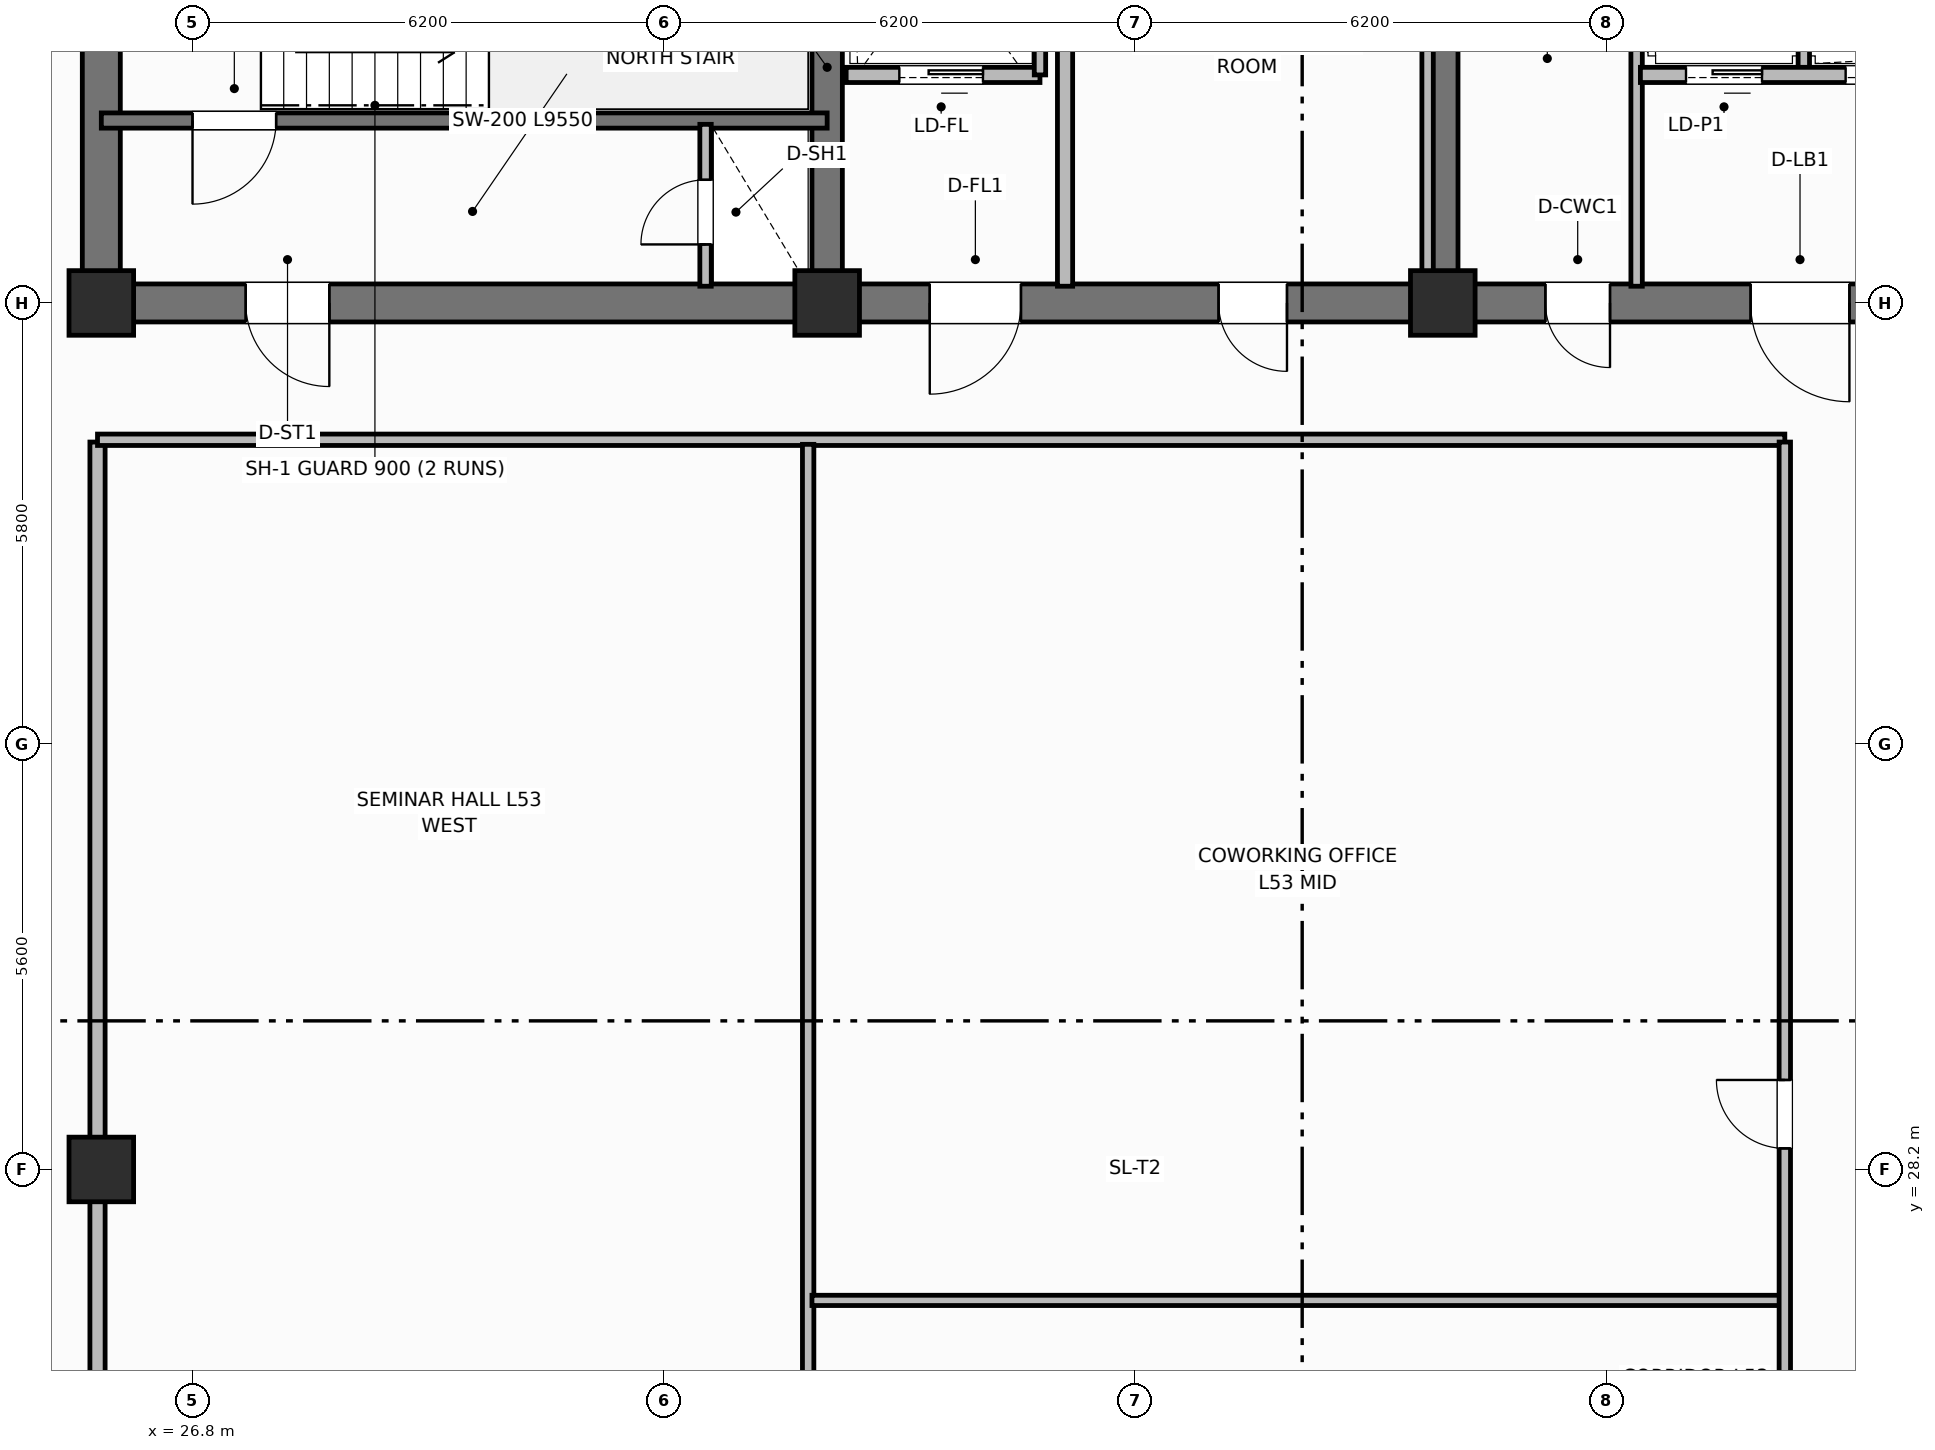
"""IFC4 building model, lengths in metres.
Left out: names, types, materials, properties, quantities, classifications, styles, units other than length and angle.
Written with IfcOpenShell. Run it as: python <this file> out.ifc"""

import sys

from ifc_helpers import new_model, si_unit, direction, frame, frame_2d, origin, origin_2d, place, context, subcontext, project, spatial, rectangle, extrude, element, fill, save


model = new_model("IFC4")
c1 = context("Model", 3, precision=1e-05, world=origin(), true_north=direction((0.0, 1.0)))
c2 = subcontext(c1, "Body", "Model", "MODEL_VIEW")
j1 = project(units=[si_unit("LENGTHUNIT", "METRE"), si_unit("PLANEANGLEUNIT", "RADIAN")], contexts=[c1])
p1 = place(None, origin())
s1 = spatial("IfcSite", under=j1, at=p1, CompositionType="ELEMENT")
p2 = place(p1, origin())
s2 = spatial("IfcBuilding", under=s1, at=p2, CompositionType="ELEMENT")
p3 = place(p2, frame((0.0, 0.0, 214.7)))
s3 = spatial("IfcBuildingStorey", under=s2, at=p3, CompositionType="ELEMENT", Elevation=214.7)
p4 = place(p3, frame((25.6, 39.85, 0.0), z_axis=(0.0, 0.0, 1.0), x_axis=(0.0, 1.0, 0.0)))
e1 = element("IfcWall", 1, at=p4, inside=s3, PredefinedType="SHEAR", context=c2, shape_type="SweptSolid", body=[
    extrude(rectangle(XDim=5.7, YDim=0.5, at=frame_2d((2.85, 0.0))), origin(), (0.0, 0.0, 1.0), 3.7),
])
p5 = place(p3, frame((52.8, 39.6, 0.0), z_axis=(0.0, 0.0, 1.0), x_axis=(-1.0, 0.0, 0.0)))
e2 = element("IfcWall", 2, at=p5, inside=s3, PredefinedType="SHEAR", context=c2, shape_type="SweptSolid", body=[
    extrude(rectangle(XDim=27.2, YDim=0.5, at=frame_2d((13.6, 0.0))), origin(), (0.0, 0.0, 1.0), 3.7),
])
p6 = place(p5, frame((24.2, 0.0, 0.0)))
e3 = element("IfcOpeningElement", 3, at=p6, cuts=e2, PredefinedType="OPENING", context=c2, shape_type="SweptSolid", body=[
    extrude(rectangle(XDim=1.1, YDim=2.15, at=frame_2d((0.55, 1.075))), frame((0.0, 0.26, 0.0), z_axis=(0.0, -1.0, 0.0), x_axis=(1.0, 0.0, 0.0)), (0.0, 0.0, 1.0), 0.52),
])
p7 = place(p5, frame((15.1, 0.0, 0.0)))
e4 = element("IfcOpeningElement", 4, at=p7, cuts=e2, PredefinedType="OPENING", context=c2, shape_type="SweptSolid", body=[
    extrude(rectangle(XDim=1.2, YDim=2.15, at=frame_2d((0.6, 1.075))), frame((0.0, 0.26, 0.0), z_axis=(0.0, -1.0, 0.0), x_axis=(1.0, 0.0, 0.0)), (0.0, 0.0, 1.0), 0.52),
])
p8 = place(p5, frame((11.6, 0.0, 0.0)))
e5 = element("IfcOpeningElement", 5, at=p8, cuts=e2, PredefinedType="OPENING", context=c2, shape_type="SweptSolid", body=[
    extrude(rectangle(XDim=0.9, YDim=2.1, at=frame_2d((0.45, 1.05))), frame((0.0, 0.26, 0.0), z_axis=(0.0, -1.0, 0.0), x_axis=(1.0, 0.0, 0.0)), (0.0, 0.0, 1.0), 0.52),
])
p9 = place(p5, frame((7.35, 0.0, 0.0)))
e6 = element("IfcOpeningElement", 6, at=p9, cuts=e2, PredefinedType="OPENING", context=c2, shape_type="SweptSolid", body=[
    extrude(rectangle(XDim=0.85, YDim=2.1, at=frame_2d((0.425, 1.05))), frame((0.0, 0.26, 0.0), z_axis=(0.0, -1.0, 0.0), x_axis=(1.0, 0.0, 0.0)), (0.0, 0.0, 1.0), 0.52),
])
p10 = place(p5, frame((4.2, 0.0, 0.0)))
e7 = element("IfcOpeningElement", 7, at=p10, cuts=e2, PredefinedType="OPENING", context=c2, shape_type="SweptSolid", body=[
    extrude(rectangle(XDim=1.3, YDim=2.2, at=frame_2d((0.65, 1.1))), frame((0.0, 0.26, 0.0), z_axis=(0.0, -1.0, 0.0), x_axis=(1.0, 0.0, 0.0)), (0.0, 0.0, 1.0), 0.52),
])
for number, where, z_axis, x_axis in (
    (8, (35.15, 39.85, 0.0), (0.0, 0.0, 1.0), (0.0, 1.0, 0.0)),
    (9, (43.25, 39.85, 0.0), (0.0, 0.0, 1.0), (0.0, 1.0, 0.0)),
):
    element("IfcWall", number, at=place(p3, frame(where, z_axis=z_axis, x_axis=x_axis)), inside=s3, PredefinedType="SHEAR", context=c2, shape_type="SweptSolid", body=[
        extrude(rectangle(XDim=5.7, YDim=0.4, at=frame_2d((2.85, 0.0))), origin(), (0.0, 0.0, 1.0), 3.7),
    ])
for number, where, z_axis, x_axis in (
    (10, (25.6, 39.6, 0.0), (0.0, 0.0, 1.0), (1.0, 0.0, 0.0)),
    (11, (35.15, 39.6, 0.0), (0.0, 0.0, 1.0), (1.0, 0.0, 0.0)),
    (12, (43.25, 39.6, 0.0), (0.0, 0.0, 1.0), (1.0, 0.0, 0.0)),
    (13, (25.6, 28.2, 0.0), (0.0, 0.0, 1.0), (1.0, 0.0, 0.0)),
):
    element("IfcColumn", number, at=place(p3, frame(where, z_axis=z_axis, x_axis=x_axis)), inside=s3, PredefinedType="COLUMN", context=c2, shape_type="SweptSolid", body=[
        extrude(rectangle(XDim=0.85, YDim=0.85, at=origin_2d()), origin(), (0.0, 0.0, 1.0), 3.7),
    ])
p11 = place(p3, frame((35.15, 42.0, 0.0), z_axis=(0.0, 0.0, 1.0), x_axis=(-1.0, 0.0, 0.0)))
e14 = element("IfcWall", 14, at=p11, inside=s3, PredefinedType="SHEAR", context=c2, shape_type="SweptSolid", body=[
    extrude(rectangle(XDim=9.55, YDim=0.2, at=frame_2d((4.775, 0.0))), origin(), (0.0, 0.0, 1.0), 3.7),
])
p12 = place(p11, frame((7.25, 0.0, 0.0)))
e15 = element("IfcOpeningElement", 15, at=p12, cuts=e14, PredefinedType="OPENING", context=c2, shape_type="SweptSolid", body=[
    extrude(rectangle(XDim=1.1, YDim=2.15, at=frame_2d((0.55, 1.075))), frame((0.0, 0.11, 0.0), z_axis=(0.0, -1.0, 0.0), x_axis=(1.0, 0.0, 0.0)), (0.0, 0.0, 1.0), 0.22),
])
p13 = place(p3, frame((33.55, 39.82, 0.0), z_axis=(0.0, 0.0, 1.0), x_axis=(0.0, 1.0, 0.0)))
e16 = element("IfcWall", 16, at=p13, inside=s3, PredefinedType="PARTITIONING", context=c2, shape_type="SweptSolid", body=[
    extrude(rectangle(XDim=2.13, YDim=0.15, at=frame_2d((1.065, 0.0))), origin(), (0.0, 0.0, 1.0), 2.55),
])
p14 = place(p13, frame((0.55, 0.0, 0.0)))
e17 = element("IfcOpeningElement", 17, at=p14, cuts=e16, PredefinedType="OPENING", context=c2, shape_type="SweptSolid", body=[
    extrude(rectangle(XDim=0.85, YDim=2.05, at=frame_2d((0.425, 1.025))), frame((0.0, 0.085, 0.0), z_axis=(0.0, -1.0, 0.0), x_axis=(1.0, 0.0, 0.0)), (0.0, 0.0, 1.0), 0.17),
])
p15 = place(p3, frame((37.95, 42.6, 0.0), z_axis=(0.0, 0.0, 1.0), x_axis=(-1.0, 0.0, 0.0)))
e18 = element("IfcWall", 18, at=p15, inside=s3, PredefinedType="PARTITIONING", context=c2, shape_type="SweptSolid", body=[
    extrude(rectangle(XDim=2.55, YDim=0.2, at=frame_2d((1.275, 0.0))), origin(), (0.0, 0.0, 1.0), 2.32),
])
p16 = place(p15, frame((0.75, 0.0, 0.0)))
e19 = element("IfcOpeningElement", 19, at=p16, cuts=e18, PredefinedType="OPENING", context=c2, shape_type="SweptSolid", body=[
    extrude(rectangle(XDim=1.1, YDim=2.15, at=frame_2d((0.55, 1.075))), frame((0.0, 0.11, 0.0), z_axis=(0.0, -1.0, 0.0), x_axis=(1.0, 0.0, 0.0)), (0.0, 0.0, 1.0), 0.22),
])
p17 = place(p3, frame((37.95, 42.6, 0.0), z_axis=(0.0, 0.0, 1.0), x_axis=(0.0, 1.0, 0.0)))
e20 = element("IfcWall", 20, at=p17, inside=s3, PredefinedType="PARTITIONING", context=c2, shape_type="SweptSolid", body=[
    extrude(rectangle(XDim=2.85, YDim=0.15, at=frame_2d((1.425, 0.0))), origin(), (0.0, 0.0, 1.0), 2.55),
])
p18 = place(p3, frame((38.28, 39.82, 0.0), z_axis=(0.0, 0.0, 1.0), x_axis=(0.0, 1.0, 0.0)))
e21 = element("IfcWall", 21, at=p18, inside=s3, PredefinedType="PARTITIONING", context=c2, shape_type="SweptSolid", body=[
    extrude(rectangle(XDim=5.63, YDim=0.2, at=frame_2d((2.815, 0.0))), origin(), (0.0, 0.0, 1.0), 2.55),
])
for number, where, z_axis, x_axis in (
    (22, (43.05, 39.82, 0.0), (0.0, 0.0, 1.0), (0.0, 1.0, 0.0)),
    (23, (45.8, 39.82, 0.0), (0.0, 0.0, 1.0), (0.0, 1.0, 0.0)),
):
    element("IfcWall", number, at=place(p3, frame(where, z_axis=z_axis, x_axis=x_axis)), inside=s3, PredefinedType="PARTITIONING", context=c2, shape_type="SweptSolid", body=[
        extrude(rectangle(XDim=5.63, YDim=0.15, at=frame_2d((2.815, 0.0))), origin(), (0.0, 0.0, 1.0), 2.55),
    ])
p19 = place(p3, frame((48.0, 42.65, 0.0), z_axis=(0.0, 0.0, 1.0), x_axis=(0.0, 1.0, 0.0)))
e24 = element("IfcWall", 24, at=p19, inside=s3, PredefinedType="PARTITIONING", context=c2, shape_type="SweptSolid", body=[
    extrude(rectangle(XDim=2.8, YDim=0.15, at=frame_2d((1.4, 0.0))), origin(), (0.0, 0.0, 1.0), 2.55),
])
p20 = place(p3, frame((52.35, 42.6, 0.0), z_axis=(0.0, 0.0, 1.0), x_axis=(-1.0, 0.0, 0.0)))
e25 = element("IfcWall", 25, at=p20, inside=s3, PredefinedType="PARTITIONING", context=c2, shape_type="SweptSolid", body=[
    extrude(rectangle(XDim=6.5, YDim=0.2, at=frame_2d((3.25, 0.0))), origin(), (0.0, 0.0, 1.0), 2.55),
])
p21 = place(p20, frame((4.9, 0.0, 0.0)))
e26 = element("IfcOpeningElement", 26, at=p21, cuts=e25, PredefinedType="OPENING", context=c2, shape_type="SweptSolid", body=[
    extrude(rectangle(XDim=1.0, YDim=2.15, at=frame_2d((0.5, 1.075))), frame((0.0, 0.11, 0.0), z_axis=(0.0, -1.0, 0.0), x_axis=(1.0, 0.0, 0.0)), (0.0, 0.0, 1.0), 0.22),
])
p22 = place(p20, frame((2.8, 0.0, 0.0)))
e27 = element("IfcOpeningElement", 27, at=p22, cuts=e25, PredefinedType="OPENING", context=c2, shape_type="SweptSolid", body=[
    extrude(rectangle(XDim=1.0, YDim=2.15, at=frame_2d((0.5, 1.075))), frame((0.0, 0.11, 0.0), z_axis=(0.0, -1.0, 0.0), x_axis=(1.0, 0.0, 0.0)), (0.0, 0.0, 1.0), 0.22),
])
p23 = place(p20, frame((0.7, 0.0, 0.0)))
e28 = element("IfcOpeningElement", 28, at=p23, cuts=e25, PredefinedType="OPENING", context=c2, shape_type="SweptSolid", body=[
    extrude(rectangle(XDim=1.0, YDim=2.15, at=frame_2d((0.5, 1.075))), frame((0.0, 0.11, 0.0), z_axis=(0.0, -1.0, 0.0), x_axis=(1.0, 0.0, 0.0)), (0.0, 0.0, 1.0), 0.22),
])
p24 = place(p3, frame((25.55, 18.63, 0.0), z_axis=(0.0, 0.0, 1.0), x_axis=(0.0, 1.0, 0.0)))
e29 = element("IfcWall", 29, at=p24, inside=s3, PredefinedType="PARTITIONING", context=c2, shape_type="SweptSolid", body=[
    extrude(rectangle(XDim=19.14, YDim=0.2, at=frame_2d((9.57, 0.0))), origin(), (0.0, 0.0, 1.0), 2.55),
])
p25 = place(p3, frame((25.55, 37.8, 0.0), z_axis=(0.0, 0.0, 1.0), x_axis=(1.0, 0.0, 0.0)))
e30 = element("IfcWall", 30, at=p25, inside=s3, PredefinedType="PARTITIONING", context=c2, shape_type="SweptSolid", body=[
    extrude(rectangle(XDim=22.2, YDim=0.15, at=frame_2d((11.1, 0.0))), origin(), (0.0, 0.0, 1.0), 2.55),
])
p26 = place(p3, frame((34.9, 18.66, 0.0), z_axis=(0.0, 0.0, 1.0), x_axis=(0.0, 1.0, 0.0)))
e31 = element("IfcWall", 31, at=p26, inside=s3, PredefinedType="PARTITIONING", context=c2, shape_type="SweptSolid", body=[
    extrude(rectangle(XDim=19.08, YDim=0.15, at=frame_2d((9.54, 0.0))), origin(), (0.0, 0.0, 1.0), 2.55),
])
p27 = place(p26, frame((5.0, 0.0, 0.0)))
e32 = element("IfcOpeningElement", 32, at=p27, cuts=e31, PredefinedType="OPENING", context=c2, shape_type="SweptSolid", body=[
    extrude(rectangle(XDim=1.0, YDim=2.15, at=frame_2d((0.5, 1.075))), frame((0.0, 0.085, 0.0), z_axis=(0.0, -1.0, 0.0), x_axis=(1.0, 0.0, 0.0)), (0.0, 0.0, 1.0), 0.17),
])
p28 = place(p3, frame((34.95, 26.477, 0.0), z_axis=(0.0, 0.0, 1.0), x_axis=(1.0, 0.0, 0.0)))
e33 = element("IfcWall", 33, at=p28, inside=s3, PredefinedType="PARTITIONING", context=c2, shape_type="SweptSolid", body=[
    extrude(rectangle(XDim=12.81, YDim=0.135, at=frame_2d((6.405, 0.0))), origin(), (0.0, 0.0, 1.0), 2.55),
])
p29 = place(p3, frame((47.75, 18.63, 0.0), z_axis=(0.0, 0.0, 1.0), x_axis=(0.0, 1.0, 0.0)))
e34 = element("IfcWall", 34, at=p29, inside=s3, PredefinedType="PARTITIONING", context=c2, shape_type="SweptSolid", body=[
    extrude(rectangle(XDim=19.14, YDim=0.15, at=frame_2d((9.57, 0.0))), origin(), (0.0, 0.0, 1.0), 2.55),
])
p30 = place(p29, frame((2.4, 0.0, 0.0)))
e35 = element("IfcOpeningElement", 35, at=p30, cuts=e34, PredefinedType="OPENING", context=c2, shape_type="SweptSolid", body=[
    extrude(rectangle(XDim=0.9, YDim=2.1, at=frame_2d((0.45, 1.05))), frame((0.0, 0.085, 0.0), z_axis=(0.0, -1.0, 0.0), x_axis=(1.0, 0.0, 0.0)), (0.0, 0.0, 1.0), 0.17),
])
p31 = place(p29, frame((9.847, 0.0, 0.0)))
e36 = element("IfcOpeningElement", 36, at=p31, cuts=e34, PredefinedType="OPENING", context=c2, shape_type="SweptSolid", body=[
    extrude(rectangle(XDim=0.9, YDim=2.1, at=frame_2d((0.45, 1.05))), frame((0.0, 0.085, 0.0), z_axis=(0.0, -1.0, 0.0), x_axis=(1.0, 0.0, 0.0)), (0.0, 0.0, 1.0), 0.17),
])
p32 = place(p12, origin())
e37 = element("IfcDoor", 37, at=p32, inside=s3, OperationType="SINGLE_SWING_RIGHT", PredefinedType="DOOR", context=c2, shape_type="SweptSolid", body=[
    extrude(rectangle(XDim=1.1, YDim=2.15, at=frame_2d((0.55, 1.075))), frame((0.0, 0.025, 0.0), z_axis=(0.0, -1.0, 0.0), x_axis=(1.0, 0.0, 0.0)), (0.0, 0.0, 1.0), 0.05),
])
fill(e15, e37)
p33 = place(p14, origin())
e38 = element("IfcDoor", 38, at=p33, inside=s3, OperationType="SINGLE_SWING_LEFT", PredefinedType="TRAPDOOR", context=c2, shape_type="SweptSolid", body=[
    extrude(rectangle(XDim=0.85, YDim=2.05, at=frame_2d((0.425, 1.025))), frame((0.0, 0.025, 0.0), z_axis=(0.0, -1.0, 0.0), x_axis=(1.0, 0.0, 0.0)), (0.0, 0.0, 1.0), 0.05),
])
fill(e17, e38)
p34 = place(p16, origin())
e39 = element("IfcDoor", 39, at=p34, inside=s3, OperationType="SLIDING_TO_LEFT", PredefinedType="DOOR", context=c2, shape_type="SweptSolid", body=[
    extrude(rectangle(XDim=1.1, YDim=2.15, at=frame_2d((0.55, 1.075))), frame((0.0, 0.025, 0.0), z_axis=(0.0, -1.0, 0.0), x_axis=(1.0, 0.0, 0.0)), (0.0, 0.0, 1.0), 0.05),
])
fill(e19, e39)
p35 = place(p21, origin())
e40 = element("IfcDoor", 40, at=p35, inside=s3, OperationType="SLIDING_TO_LEFT", PredefinedType="DOOR", context=c2, shape_type="SweptSolid", body=[
    extrude(rectangle(XDim=1.0, YDim=2.15, at=frame_2d((0.5, 1.075))), frame((0.0, 0.025, 0.0), z_axis=(0.0, -1.0, 0.0), x_axis=(1.0, 0.0, 0.0)), (0.0, 0.0, 1.0), 0.05),
])
fill(e26, e40)
p36 = place(p22, origin())
e41 = element("IfcDoor", 41, at=p36, inside=s3, OperationType="SLIDING_TO_LEFT", PredefinedType="DOOR", context=c2, shape_type="SweptSolid", body=[
    extrude(rectangle(XDim=1.0, YDim=2.15, at=frame_2d((0.5, 1.075))), frame((0.0, 0.025, 0.0), z_axis=(0.0, -1.0, 0.0), x_axis=(1.0, 0.0, 0.0)), (0.0, 0.0, 1.0), 0.05),
])
fill(e27, e41)
p37 = place(p31, origin())
e42 = element("IfcDoor", 42, at=p37, inside=s3, OperationType="SINGLE_SWING_RIGHT", PredefinedType="DOOR", context=c2, shape_type="SweptSolid", body=[
    extrude(rectangle(XDim=0.9, YDim=2.1, at=frame_2d((0.45, 1.05))), frame((0.0, 0.025, 0.0), z_axis=(0.0, -1.0, 0.0), x_axis=(1.0, 0.0, 0.0)), (0.0, 0.0, 1.0), 0.05),
])
fill(e36, e42)
p38 = place(p6, origin())
e43 = element("IfcDoor", 43, at=p38, inside=s3, OperationType="SINGLE_SWING_LEFT", PredefinedType="DOOR", context=c2, shape_type="SweptSolid", body=[
    extrude(rectangle(XDim=1.1, YDim=2.15, at=frame_2d((0.55, 1.075))), frame((0.0, 0.025, 0.0), z_axis=(0.0, -1.0, 0.0), x_axis=(1.0, 0.0, 0.0)), (0.0, 0.0, 1.0), 0.05),
])
fill(e3, e43)
p39 = place(p7, origin())
e44 = element("IfcDoor", 44, at=p39, inside=s3, OperationType="SINGLE_SWING_RIGHT", PredefinedType="DOOR", context=c2, shape_type="SweptSolid", body=[
    extrude(rectangle(XDim=1.2, YDim=2.15, at=frame_2d((0.6, 1.075))), frame((0.0, 0.025, 0.0), z_axis=(0.0, -1.0, 0.0), x_axis=(1.0, 0.0, 0.0)), (0.0, 0.0, 1.0), 0.05),
])
fill(e4, e44)
p40 = place(p8, origin())
e45 = element("IfcDoor", 45, at=p40, inside=s3, OperationType="SINGLE_SWING_LEFT", PredefinedType="DOOR", context=c2, shape_type="SweptSolid", body=[
    extrude(rectangle(XDim=0.9, YDim=2.1, at=frame_2d((0.45, 1.05))), frame((0.0, 0.025, 0.0), z_axis=(0.0, -1.0, 0.0), x_axis=(1.0, 0.0, 0.0)), (0.0, 0.0, 1.0), 0.05),
])
fill(e5, e45)
p41 = place(p9, origin())
e46 = element("IfcDoor", 46, at=p41, inside=s3, OperationType="SINGLE_SWING_LEFT", PredefinedType="DOOR", context=c2, shape_type="SweptSolid", body=[
    extrude(rectangle(XDim=0.85, YDim=2.1, at=frame_2d((0.425, 1.05))), frame((0.0, 0.025, 0.0), z_axis=(0.0, -1.0, 0.0), x_axis=(1.0, 0.0, 0.0)), (0.0, 0.0, 1.0), 0.05),
])
fill(e6, e46)
p42 = place(p10, origin())
e47 = element("IfcDoor", 47, at=p42, inside=s3, OperationType="SINGLE_SWING_LEFT", PredefinedType="DOOR", context=c2, shape_type="SweptSolid", body=[
    extrude(rectangle(XDim=1.3, YDim=2.2, at=frame_2d((0.65, 1.1))), frame((0.0, 0.025, 0.0), z_axis=(0.0, -1.0, 0.0), x_axis=(1.0, 0.0, 0.0)), (0.0, 0.0, 1.0), 0.05),
])
fill(e7, e47)
save(model, sys.argv[1])
